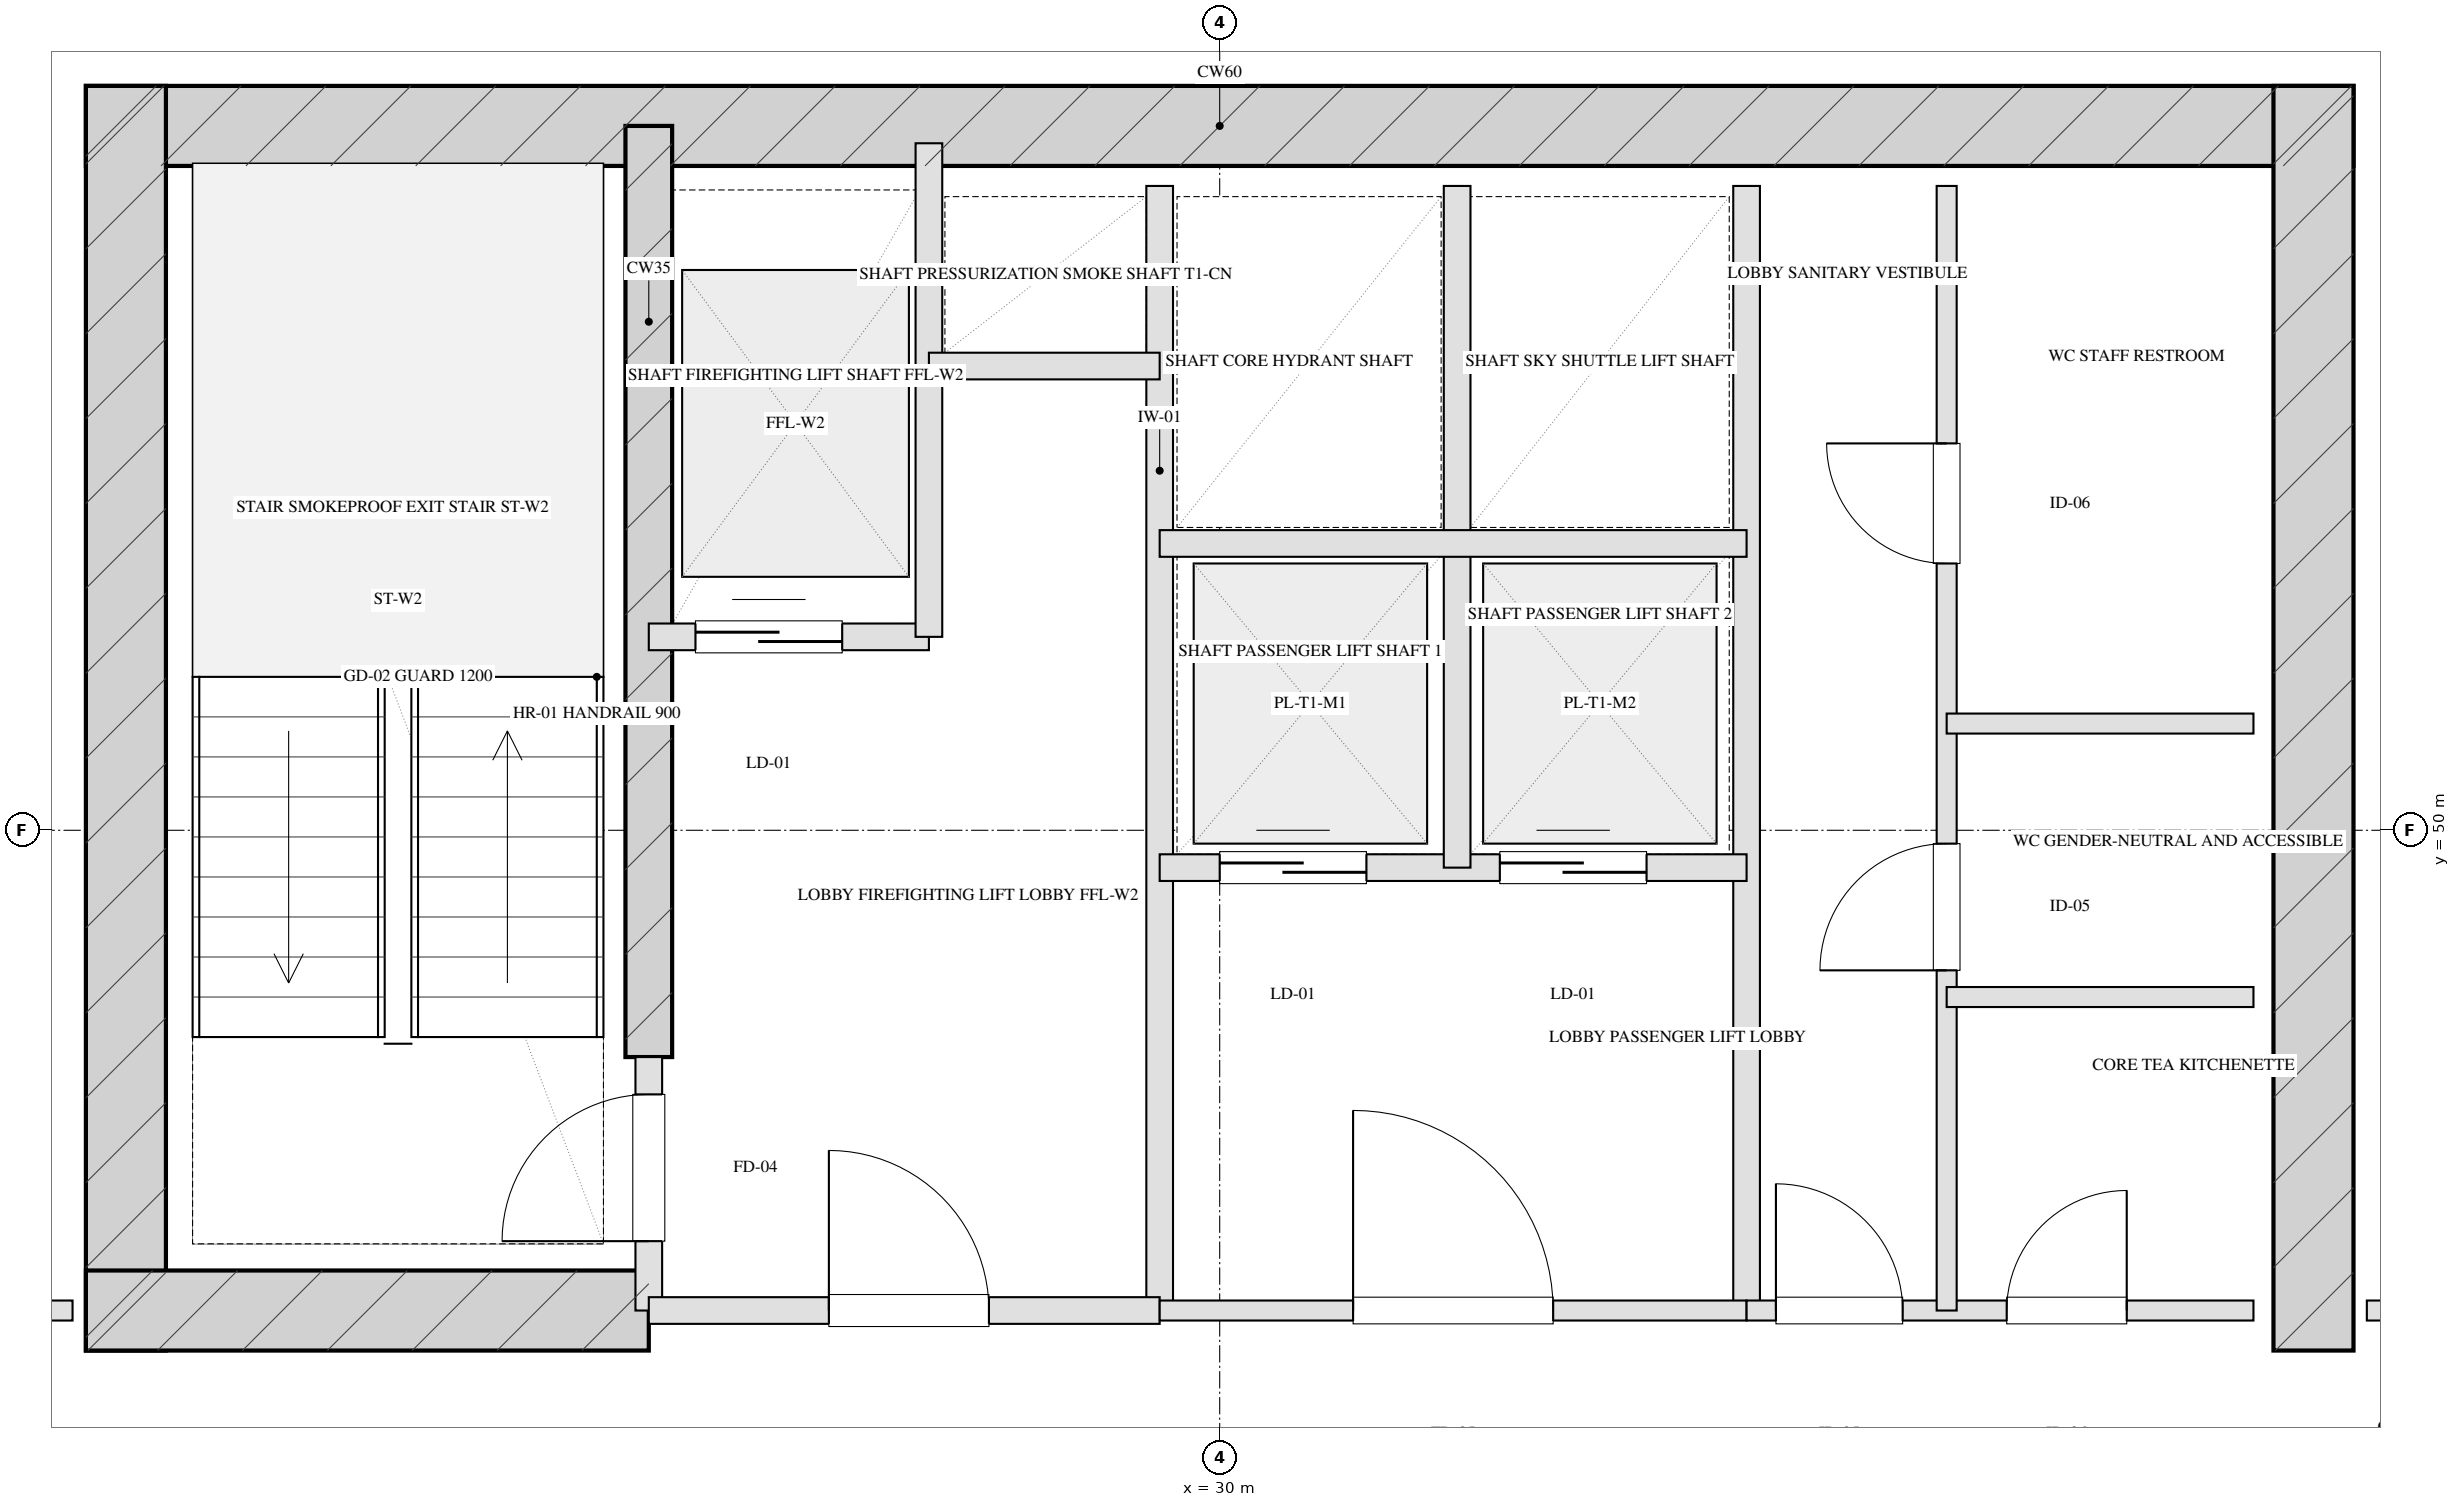
"""IFC4 building model, lengths in metres.
Left out: names, types, materials, properties, quantities, classifications, styles, units other than length and angle.
Written with IfcOpenShell. Run it as: python <this file> out.ifc"""

import sys

from ifc_helpers import new_model, si_unit, direction, frame, frame_2d, origin, place, context, subcontext, project, spatial, rectangle, extrude, element, fill, save


model = new_model("IFC4")
c1 = context("Model", 3, precision=1e-05, world=origin(), true_north=direction((0.0, 1.0)))
c2 = subcontext(c1, "Body", "Model", "MODEL_VIEW")
j1 = project(units=[si_unit("LENGTHUNIT", "METRE"), si_unit("PLANEANGLEUNIT", "RADIAN")], contexts=[c1])
p1 = place(None, origin())
s1 = spatial("IfcSite", under=j1, at=p1, CompositionType="ELEMENT")
p2 = place(p1, origin())
s2 = spatial("IfcBuilding", under=s1, at=p2, CompositionType="ELEMENT")
p3 = place(p2, frame((0.0, 0.0, 96.6)))
s3 = spatial("IfcBuildingStorey", under=s2, at=p3, CompositionType="ELEMENT", Elevation=96.6)
p4 = place(p3, frame((21.5, 55.28, 0.0), z_axis=(0.0, 0.0, 1.0), x_axis=(1.0, 0.0, 0.0)))
e1 = element("IfcWall", 1, at=p4, inside=s3, PredefinedType="SHEAR", context=c2, shape_type="SweptSolid", body=[
    extrude(rectangle(XDim=17.0, YDim=0.6, at=frame_2d((8.5, 0.0))), origin(), (0.0, 0.0, 1.0), 3.45),
])
for number, where, z_axis, x_axis in (
    (2, (21.8, 46.1, 0.0), (0.0, 0.0, 1.0), (0.0, 1.0, 0.0)),
    (3, (38.2, 46.1, 0.0), (0.0, 0.0, 1.0), (0.0, 1.0, 0.0)),
):
    element("IfcWall", number, at=place(p3, frame(where, z_axis=z_axis, x_axis=x_axis)), inside=s3, PredefinedType="SHEAR", context=c2, shape_type="SweptSolid", body=[
        extrude(rectangle(XDim=9.48, YDim=0.6, at=frame_2d((4.74, 0.0))), origin(), (0.0, 0.0, 1.0), 3.45),
    ])
p5 = place(p3, frame((25.72, 48.3, 0.0), z_axis=(0.0, 0.0, 1.0), x_axis=(0.0, 1.0, 0.0)))
e4 = element("IfcWall", 4, at=p5, inside=s3, PredefinedType="SHEAR", context=c2, shape_type="SweptSolid", body=[
    extrude(rectangle(XDim=6.98, YDim=0.35, at=frame_2d((3.49, 0.0))), origin(), (0.0, 0.0, 1.0), 3.45),
])
p6 = place(p3, frame((21.5, 46.4, 0.0), z_axis=(0.0, 0.0, 1.0), x_axis=(1.0, 0.0, 0.0)))
e5 = element("IfcWall", 5, at=p6, inside=s3, PredefinedType="SHEAR", context=c2, shape_type="SweptSolid", body=[
    extrude(rectangle(XDim=4.22, YDim=0.6, at=frame_2d((2.11, 0.0))), origin(), (0.0, 0.0, 1.0), 3.45),
])
p7 = place(p3, frame((25.72, 46.4, 0.0), z_axis=(0.0, 0.0, 1.0), x_axis=(0.0, 1.0, 0.0)))
e6 = element("IfcWall", 6, at=p7, inside=s3, PredefinedType="PARTITIONING", context=c2, shape_type="SweptSolid", body=[
    extrude(rectangle(XDim=1.9, YDim=0.2, at=frame_2d((0.95, 0.0))), origin(), (0.0, 0.0, 1.0), 3.155),
])
p8 = place(p7, frame((0.52, 0.0, 0.0)))
e7 = element("IfcOpeningElement", 7, at=p8, cuts=e6, PredefinedType="OPENING", context=c2, shape_type="SweptSolid", body=[
    extrude(rectangle(XDim=1.1, YDim=2.05, at=frame_2d((0.55, 1.025))), frame((0.0, 0.11, 0.0), z_axis=(0.0, -1.0, 0.0), x_axis=(1.0, 0.0, 0.0)), (0.0, 0.0, 1.0), 0.22),
])
p9 = place(p3, frame((29.55, 46.4, 0.0), z_axis=(0.0, 0.0, 1.0), x_axis=(0.0, 1.0, 0.0)))
e8 = element("IfcWall", 8, at=p9, inside=s3, PredefinedType="PARTITIONING", context=c2, shape_type="SweptSolid", body=[
    extrude(rectangle(XDim=8.43, YDim=0.2, at=frame_2d((4.215, 0.0))), origin(), (0.0, 0.0, 1.0), 3.155),
])
p10 = place(p3, frame((25.72, 46.4, 0.0), z_axis=(0.0, 0.0, 1.0), x_axis=(1.0, 0.0, 0.0)))
e9 = element("IfcWall", 9, at=p10, inside=s3, PredefinedType="PARTITIONING", context=c2, shape_type="SweptSolid", body=[
    extrude(rectangle(XDim=3.83, YDim=0.2, at=frame_2d((1.915, 0.0))), origin(), (0.0, 0.0, 1.0), 3.155),
])
p11 = place(p10, frame((1.35, 0.0, 0.0)))
e10 = element("IfcOpeningElement", 10, at=p11, cuts=e9, PredefinedType="OPENING", context=c2, shape_type="SweptSolid", body=[
    extrude(rectangle(XDim=1.2, YDim=2.05, at=frame_2d((0.6, 1.025))), frame((0.0, 0.11, 0.0), z_axis=(0.0, -1.0, 0.0), x_axis=(1.0, 0.0, 0.0)), (0.0, 0.0, 1.0), 0.22),
])
p12 = place(p3, frame((25.72, 51.45, 0.0), z_axis=(0.0, 0.0, 1.0), x_axis=(1.0, 0.0, 0.0)))
e11 = element("IfcWall", 11, at=p12, inside=s3, PredefinedType="PARTITIONING", context=c2, shape_type="SweptSolid", body=[
    extrude(rectangle(XDim=2.1, YDim=0.2, at=frame_2d((1.05, 0.0))), origin(), (0.0, 0.0, 1.0), 3.155),
])
p13 = place(p12, frame((0.35, 0.0, 0.0)))
e12 = element("IfcOpeningElement", 12, at=p13, cuts=e11, PredefinedType="OPENING", context=c2, shape_type="SweptSolid", body=[
    extrude(rectangle(XDim=1.1, YDim=2.05, at=frame_2d((0.55, 1.025))), frame((0.0, 0.11, 0.0), z_axis=(0.0, -1.0, 0.0), x_axis=(1.0, 0.0, 0.0)), (0.0, 0.0, 1.0), 0.22),
])
p14 = place(p3, frame((27.82, 51.45, 0.0), z_axis=(0.0, 0.0, 1.0), x_axis=(0.0, 1.0, 0.0)))
e13 = element("IfcWall", 13, at=p14, inside=s3, PredefinedType="PARTITIONING", context=c2, shape_type="SweptSolid", body=[
    extrude(rectangle(XDim=3.7, YDim=0.2, at=frame_2d((1.85, 0.0))), origin(), (0.0, 0.0, 1.0), 3.155),
])
p15 = place(p3, frame((27.82, 53.48, 0.0), z_axis=(0.0, 0.0, 1.0), x_axis=(1.0, 0.0, 0.0)))
e14 = element("IfcWall", 14, at=p15, inside=s3, PredefinedType="PARTITIONING", context=c2, shape_type="SweptSolid", body=[
    extrude(rectangle(XDim=1.73, YDim=0.2, at=frame_2d((0.865, 0.0))), origin(), (0.0, 0.0, 1.0), 3.155),
])
p16 = place(p3, frame((33.95, 46.4, 0.0), z_axis=(0.0, 0.0, 1.0), x_axis=(0.0, 1.0, 0.0)))
e15 = element("IfcWall", 15, at=p16, inside=s3, PredefinedType="PARTITIONING", context=c2, shape_type="SweptSolid", body=[
    extrude(rectangle(XDim=8.43, YDim=0.2, at=frame_2d((4.215, 0.0))), origin(), (0.0, 0.0, 1.0), 3.155),
])
p17 = place(p3, frame((29.55, 46.4, 0.0), z_axis=(0.0, 0.0, 1.0), x_axis=(1.0, 0.0, 0.0)))
e16 = element("IfcWall", 16, at=p17, inside=s3, PredefinedType="PARTITIONING", context=c2, shape_type="SweptSolid", body=[
    extrude(rectangle(XDim=4.4, YDim=0.15, at=frame_2d((2.2, 0.0))), origin(), (0.0, 0.0, 1.0), 3.155),
])
p18 = place(p17, frame((1.45, 0.0, 0.0)))
e17 = element("IfcOpeningElement", 17, at=p18, cuts=e16, PredefinedType="OPENING", context=c2, shape_type="SweptSolid", body=[
    extrude(rectangle(XDim=1.5, YDim=2.05, at=frame_2d((0.75, 1.025))), frame((0.0, 0.085, 0.0), z_axis=(0.0, -1.0, 0.0), x_axis=(1.0, 0.0, 0.0)), (0.0, 0.0, 1.0), 0.17),
])
p19 = place(p3, frame((29.55, 49.72, 0.0), z_axis=(0.0, 0.0, 1.0), x_axis=(1.0, 0.0, 0.0)))
e18 = element("IfcWall", 18, at=p19, inside=s3, PredefinedType="PARTITIONING", context=c2, shape_type="SweptSolid", body=[
    extrude(rectangle(XDim=4.4, YDim=0.2, at=frame_2d((2.2, 0.0))), origin(), (0.0, 0.0, 1.0), 3.155),
])
p20 = place(p19, frame((0.45, 0.0, 0.0)))
e19 = element("IfcOpeningElement", 19, at=p20, cuts=e18, PredefinedType="OPENING", context=c2, shape_type="SweptSolid", body=[
    extrude(rectangle(XDim=1.1, YDim=2.05, at=frame_2d((0.55, 1.025))), frame((0.0, 0.11, 0.0), z_axis=(0.0, -1.0, 0.0), x_axis=(1.0, 0.0, 0.0)), (0.0, 0.0, 1.0), 0.22),
])
p21 = place(p19, frame((2.55, 0.0, 0.0)))
e20 = element("IfcOpeningElement", 20, at=p21, cuts=e18, PredefinedType="OPENING", context=c2, shape_type="SweptSolid", body=[
    extrude(rectangle(XDim=1.1, YDim=2.05, at=frame_2d((0.55, 1.025))), frame((0.0, 0.11, 0.0), z_axis=(0.0, -1.0, 0.0), x_axis=(1.0, 0.0, 0.0)), (0.0, 0.0, 1.0), 0.22),
])
p22 = place(p3, frame((31.78, 49.72, 0.0), z_axis=(0.0, 0.0, 1.0), x_axis=(0.0, 1.0, 0.0)))
e21 = element("IfcWall", 21, at=p22, inside=s3, PredefinedType="PARTITIONING", context=c2, shape_type="SweptSolid", body=[
    extrude(rectangle(XDim=5.11, YDim=0.2, at=frame_2d((2.555, 0.0))), origin(), (0.0, 0.0, 1.0), 3.155),
])
p23 = place(p3, frame((29.55, 52.15, 0.0), z_axis=(0.0, 0.0, 1.0), x_axis=(1.0, 0.0, 0.0)))
e22 = element("IfcWall", 22, at=p23, inside=s3, PredefinedType="PARTITIONING", context=c2, shape_type="SweptSolid", body=[
    extrude(rectangle(XDim=4.4, YDim=0.2, at=frame_2d((2.2, 0.0))), origin(), (0.0, 0.0, 1.0), 3.155),
])
p24 = place(p3, frame((33.95, 46.4, 0.0), z_axis=(0.0, 0.0, 1.0), x_axis=(1.0, 0.0, 0.0)))
e23 = element("IfcWall", 23, at=p24, inside=s3, PredefinedType="PARTITIONING", context=c2, shape_type="SweptSolid", body=[
    extrude(rectangle(XDim=3.8, YDim=0.15, at=frame_2d((1.9, 0.0))), origin(), (0.0, 0.0, 1.0), 3.155),
])
p25 = place(p24, frame((0.22, 0.0, 0.0)))
e24 = element("IfcOpeningElement", 24, at=p25, cuts=e23, PredefinedType="OPENING", context=c2, shape_type="SweptSolid", body=[
    extrude(rectangle(XDim=0.95, YDim=2.05, at=frame_2d((0.475, 1.025))), frame((0.0, 0.085, 0.0), z_axis=(0.0, -1.0, 0.0), x_axis=(1.0, 0.0, 0.0)), (0.0, 0.0, 1.0), 0.17),
])
p26 = place(p24, frame((1.95, 0.0, 0.0)))
e25 = element("IfcOpeningElement", 25, at=p26, cuts=e23, PredefinedType="OPENING", context=c2, shape_type="SweptSolid", body=[
    extrude(rectangle(XDim=0.9, YDim=2.05, at=frame_2d((0.45, 1.025))), frame((0.0, 0.085, 0.0), z_axis=(0.0, -1.0, 0.0), x_axis=(1.0, 0.0, 0.0)), (0.0, 0.0, 1.0), 0.17),
])
p27 = place(p3, frame((35.45, 46.4, 0.0), z_axis=(0.0, 0.0, 1.0), x_axis=(0.0, 1.0, 0.0)))
e26 = element("IfcWall", 26, at=p27, inside=s3, PredefinedType="PARTITIONING", context=c2, shape_type="SweptSolid", body=[
    extrude(rectangle(XDim=8.43, YDim=0.15, at=frame_2d((4.215, 0.0))), origin(), (0.0, 0.0, 1.0), 2.765),
])
p28 = place(p27, frame((2.55, 0.0, 0.0)))
e27 = element("IfcOpeningElement", 27, at=p28, cuts=e26, PredefinedType="OPENING", context=c2, shape_type="SweptSolid", body=[
    extrude(rectangle(XDim=0.95, YDim=2.05, at=frame_2d((0.475, 1.025))), frame((0.0, 0.085, 0.0), z_axis=(0.0, -1.0, 0.0), x_axis=(1.0, 0.0, 0.0)), (0.0, 0.0, 1.0), 0.17),
])
p29 = place(p27, frame((5.6, 0.0, 0.0)))
e28 = element("IfcOpeningElement", 28, at=p29, cuts=e26, PredefinedType="OPENING", context=c2, shape_type="SweptSolid", body=[
    extrude(rectangle(XDim=0.9, YDim=2.05, at=frame_2d((0.45, 1.025))), frame((0.0, 0.085, 0.0), z_axis=(0.0, -1.0, 0.0), x_axis=(1.0, 0.0, 0.0)), (0.0, 0.0, 1.0), 0.17),
])
for number, where, z_axis, x_axis in (
    (29, (35.45, 50.8, 0.0), (0.0, 0.0, 1.0), (1.0, 0.0, 0.0)),
    (30, (35.45, 48.75, 0.0), (0.0, 0.0, 1.0), (1.0, 0.0, 0.0)),
):
    element("IfcWall", number, at=place(p3, frame(where, z_axis=z_axis, x_axis=x_axis)), inside=s3, PredefinedType="PARTITIONING", context=c2, shape_type="SweptSolid", body=[
        extrude(rectangle(XDim=2.3, YDim=0.15, at=frame_2d((1.15, 0.0))), origin(), (0.0, 0.0, 1.0), 3.155),
    ])
p30 = place(p3, frame((11.4, 46.4, 0.0), z_axis=(0.0, 0.0, 1.0), x_axis=(1.0, 0.0, 0.0)))
e31 = element("IfcWall", 31, at=p30, inside=s3, PredefinedType="PARTITIONING", context=c2, shape_type="SweptSolid", body=[
    extrude(rectangle(XDim=10.0, YDim=0.15, at=frame_2d((5.0, 0.0))), origin(), (0.0, 0.0, 1.0), 3.155),
])
p31 = place(p30, frame((4.2, 0.0, 0.0)))
e32 = element("IfcOpeningElement", 32, at=p31, cuts=e31, PredefinedType="OPENING", context=c2, shape_type="SweptSolid", body=[
    extrude(rectangle(XDim=1.05, YDim=2.05, at=frame_2d((0.525, 1.025))), frame((0.0, 0.085, 0.0), z_axis=(0.0, -1.0, 0.0), x_axis=(1.0, 0.0, 0.0)), (0.0, 0.0, 1.0), 0.17),
])
p32 = place(p3, frame((38.6, 46.4, 0.0), z_axis=(0.0, 0.0, 1.0), x_axis=(1.0, 0.0, 0.0)))
e33 = element("IfcWall", 33, at=p32, inside=s3, PredefinedType="PARTITIONING", context=c2, shape_type="SweptSolid", body=[
    extrude(rectangle(XDim=10.0, YDim=0.15, at=frame_2d((5.0, 0.0))), origin(), (0.0, 0.0, 1.0), 3.155),
])
p33 = place(p32, frame((4.2, 0.0, 0.0)))
e34 = element("IfcOpeningElement", 34, at=p33, cuts=e33, PredefinedType="OPENING", context=c2, shape_type="SweptSolid", body=[
    extrude(rectangle(XDim=1.0, YDim=2.05, at=frame_2d((0.5, 1.025))), frame((0.0, 0.085, 0.0), z_axis=(0.0, -1.0, 0.0), x_axis=(1.0, 0.0, 0.0)), (0.0, 0.0, 1.0), 0.17),
])
p34 = place(p8, origin())
e35 = element("IfcDoor", 35, at=p34, inside=s3, OperationType="SINGLE_SWING_LEFT", PredefinedType="DOOR", context=c2, shape_type="SweptSolid", body=[
    extrude(rectangle(XDim=1.1, YDim=2.05, at=frame_2d((0.55, 1.025))), frame((0.0, 0.025, 0.0), z_axis=(0.0, -1.0, 0.0), x_axis=(1.0, 0.0, 0.0)), (0.0, 0.0, 1.0), 0.05),
])
fill(e7, e35)
p35 = place(p11, origin())
e36 = element("IfcDoor", 36, at=p35, inside=s3, OperationType="SINGLE_SWING_LEFT", PredefinedType="DOOR", context=c2, shape_type="SweptSolid", body=[
    extrude(rectangle(XDim=1.2, YDim=2.05, at=frame_2d((0.6, 1.025))), frame((0.0, 0.025, 0.0), z_axis=(0.0, -1.0, 0.0), x_axis=(1.0, 0.0, 0.0)), (0.0, 0.0, 1.0), 0.05),
])
fill(e10, e36)
p36 = place(p13, origin())
e37 = element("IfcDoor", 37, at=p36, inside=s3, OperationType="DOUBLE_DOOR_SLIDING", PredefinedType="DOOR", context=c2, shape_type="SweptSolid", body=[
    extrude(rectangle(XDim=1.1, YDim=2.05, at=frame_2d((0.55, 1.025))), frame((0.0, 0.025, 0.0), z_axis=(0.0, -1.0, 0.0), x_axis=(1.0, 0.0, 0.0)), (0.0, 0.0, 1.0), 0.05),
])
fill(e12, e37)
p37 = place(p18, origin())
e38 = element("IfcDoor", 38, at=p37, inside=s3, OperationType="SINGLE_SWING_LEFT", PredefinedType="DOOR", context=c2, shape_type="SweptSolid", body=[
    extrude(rectangle(XDim=1.5, YDim=2.05, at=frame_2d((0.75, 1.025))), frame((0.0, 0.025, 0.0), z_axis=(0.0, -1.0, 0.0), x_axis=(1.0, 0.0, 0.0)), (0.0, 0.0, 1.0), 0.05),
])
fill(e17, e38)
p38 = place(p20, origin())
e39 = element("IfcDoor", 39, at=p38, inside=s3, OperationType="DOUBLE_DOOR_SLIDING", PredefinedType="DOOR", context=c2, shape_type="SweptSolid", body=[
    extrude(rectangle(XDim=1.1, YDim=2.05, at=frame_2d((0.55, 1.025))), frame((0.0, 0.025, 0.0), z_axis=(0.0, -1.0, 0.0), x_axis=(1.0, 0.0, 0.0)), (0.0, 0.0, 1.0), 0.05),
])
fill(e19, e39)
p39 = place(p21, origin())
e40 = element("IfcDoor", 40, at=p39, inside=s3, OperationType="DOUBLE_DOOR_SLIDING", PredefinedType="DOOR", context=c2, shape_type="SweptSolid", body=[
    extrude(rectangle(XDim=1.1, YDim=2.05, at=frame_2d((0.55, 1.025))), frame((0.0, 0.025, 0.0), z_axis=(0.0, -1.0, 0.0), x_axis=(1.0, 0.0, 0.0)), (0.0, 0.0, 1.0), 0.05),
])
fill(e20, e40)
p40 = place(p25, origin())
e41 = element("IfcDoor", 41, at=p40, inside=s3, OperationType="SINGLE_SWING_LEFT", PredefinedType="DOOR", context=c2, shape_type="SweptSolid", body=[
    extrude(rectangle(XDim=0.95, YDim=2.05, at=frame_2d((0.475, 1.025))), frame((0.0, 0.025, 0.0), z_axis=(0.0, -1.0, 0.0), x_axis=(1.0, 0.0, 0.0)), (0.0, 0.0, 1.0), 0.05),
])
fill(e24, e41)
p41 = place(p26, origin())
e42 = element("IfcDoor", 42, at=p41, inside=s3, OperationType="SINGLE_SWING_RIGHT", PredefinedType="DOOR", context=c2, shape_type="SweptSolid", body=[
    extrude(rectangle(XDim=0.9, YDim=2.05, at=frame_2d((0.45, 1.025))), frame((0.0, 0.025, 0.0), z_axis=(0.0, -1.0, 0.0), x_axis=(1.0, 0.0, 0.0)), (0.0, 0.0, 1.0), 0.05),
])
fill(e25, e42)
p42 = place(p28, origin())
e43 = element("IfcDoor", 43, at=p42, inside=s3, OperationType="SINGLE_SWING_LEFT", PredefinedType="DOOR", context=c2, shape_type="SweptSolid", body=[
    extrude(rectangle(XDim=0.95, YDim=2.05, at=frame_2d((0.475, 1.025))), frame((0.0, 0.025, 0.0), z_axis=(0.0, -1.0, 0.0), x_axis=(1.0, 0.0, 0.0)), (0.0, 0.0, 1.0), 0.05),
])
fill(e27, e43)
p43 = place(p29, origin())
e44 = element("IfcDoor", 44, at=p43, inside=s3, OperationType="SINGLE_SWING_RIGHT", PredefinedType="DOOR", context=c2, shape_type="SweptSolid", body=[
    extrude(rectangle(XDim=0.9, YDim=2.05, at=frame_2d((0.45, 1.025))), frame((0.0, 0.025, 0.0), z_axis=(0.0, -1.0, 0.0), x_axis=(1.0, 0.0, 0.0)), (0.0, 0.0, 1.0), 0.05),
])
fill(e28, e44)
save(model, sys.argv[1])
